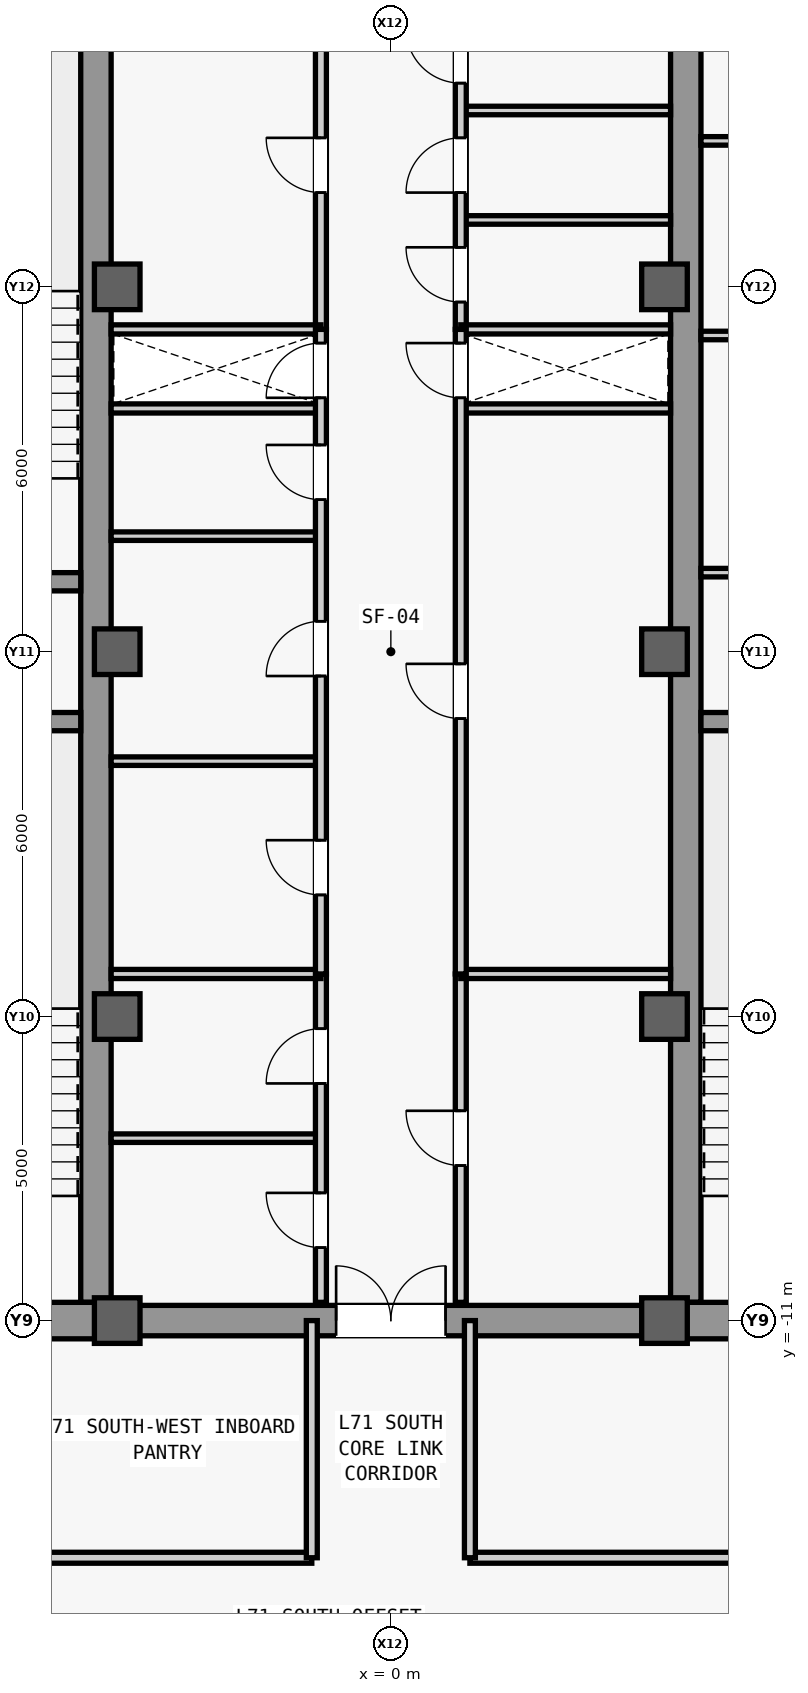
"""IFC4 building model, lengths in metres.
Left out: names, types, materials, properties, quantities, classifications, styles, units other than length and angle.
Written with IfcOpenShell. Run it as: python <this file> out.ifc"""

import sys

from ifc_helpers import new_model, si_unit, direction, frame, frame_2d, origin, origin_2d, place, context, subcontext, project, spatial, rectangle, extrude, source, transform, mapped, element, fill, save


model = new_model("IFC4")
c1 = context("Model", 3, precision=1e-05, world=origin(), true_north=direction((0.0, 1.0)))
c2 = subcontext(c1, "Body", "Model", "MODEL_VIEW")
j1 = project(units=[si_unit("LENGTHUNIT", "METRE"), si_unit("PLANEANGLEUNIT", "RADIAN")], contexts=[c1])
p1 = place(None, origin())
s1 = spatial("IfcSite", under=j1, at=p1, CompositionType="ELEMENT")
p2 = place(p1, origin())
s2 = spatial("IfcBuilding", under=s1, at=p2, CompositionType="ELEMENT")
p3 = place(p2, frame((0.0, 0.0, 301.5)))
s3 = spatial("IfcBuildingStorey", under=s2, at=p3, CompositionType="ELEMENT", Elevation=301.5)
m1 = source(origin(), c2, "Body", "SweptSolid", [
    extrude(rectangle(XDim=21.4, YDim=0.5, at=frame_2d((10.7, 0.0))), origin(), (0.0, 0.0, 1.0), 3.78),
])
for number, where, z_axis, x_axis in (
    (1, (-4.85, -10.7, 0.0), (0.0, 0.0, 1.0), (0.0, 1.0, 0.0)),
    (2, (4.85, -10.7, 0.0), (0.0, 0.0, 1.0), (0.0, 1.0, 0.0)),
):
    element("IfcWall", number, at=place(p3, frame(where, z_axis=z_axis, x_axis=x_axis)), inside=s3, PredefinedType="SHEAR", context=c2, shape_type="MappedRepresentation", body=[
        mapped(m1, transform((0.0, 0.0, 0.0), scale=1.0)),
    ])
m2 = source(origin(), c2, "Body", "SweptSolid", [
    extrude(rectangle(XDim=5.9, YDim=0.6, at=frame_2d((2.95, 0.0))), origin(), (0.0, 0.0, 1.0), 3.78),
])
for number, where, z_axis, x_axis in (
    (3, (-10.75, -11.0, 0.0), (0.0, 0.0, 1.0), (1.0, 0.0, 0.0)),
    (4, (4.85, -11.0, 0.0), (0.0, 0.0, 1.0), (1.0, 0.0, 0.0)),
):
    element("IfcWall", number, at=place(p3, frame(where, z_axis=z_axis, x_axis=x_axis)), inside=s3, PredefinedType="SHEAR", context=c2, shape_type="MappedRepresentation", body=[
        mapped(m2, transform((0.0, 0.0, 0.0), scale=1.0)),
    ])
m3 = source(origin(), c2, "Body", "SweptSolid", [
    extrude(rectangle(XDim=5.65, YDim=0.3, at=frame_2d((2.825, 0.0))), origin(), (0.0, 0.0, 1.0), 3.78),
])
for number, where, z_axis, x_axis in (
    (5, (-10.75, -1.15, 0.0), (0.0, 0.0, 1.0), (1.0, 0.0, 0.0)),
    (6, (-10.75, 1.15, 0.0), (0.0, 0.0, 1.0), (1.0, 0.0, 0.0)),
    (7, (5.1, -1.15, 0.0), (0.0, 0.0, 1.0), (1.0, 0.0, 0.0)),
):
    element("IfcWall", number, at=place(p3, frame(where, z_axis=z_axis, x_axis=x_axis)), inside=s3, PredefinedType="SHEAR", context=c2, shape_type="MappedRepresentation", body=[
        mapped(m3, transform((0.0, 0.0, 0.0), scale=1.0)),
    ])
m4 = source(origin(), c2, "Body", "SweptSolid", [
    extrude(rectangle(XDim=9.2, YDim=0.5, at=frame_2d((4.6, 0.0))), origin(), (0.0, 0.0, 1.0), 3.78),
])
p4 = place(p3, frame((-4.6, -11.0, 0.0), z_axis=(0.0, 0.0, 1.0), x_axis=(1.0, 0.0, 0.0)))
e8 = element("IfcWall", 8, at=p4, inside=s3, PredefinedType="SHEAR", context=c2, shape_type="MappedRepresentation", body=[
    mapped(m4, transform((0.0, 0.0, 0.0), scale=1.0)),
])
m5 = source(origin(), c2, "Body", "SweptSolid", [
    extrude(rectangle(XDim=1.8, YDim=2.25, at=frame_2d((0.9, 1.125))), frame((0.0, 0.26, 0.0), z_axis=(0.0, -1.0, 0.0), x_axis=(1.0, 0.0, 0.0)), (0.0, 0.0, 1.0), 0.52),
])
p5 = place(p4, frame((3.7, 0.0, 0.0)))
e9 = element("IfcOpeningElement", 9, at=p5, cuts=e8, PredefinedType="OPENING", context=c2, shape_type="MappedRepresentation", body=[
    mapped(m5, transform((0.0, 0.0, 0.0), scale=1.0)),
])
m6 = source(origin(), c2, "Body", "SweptSolid", [
    extrude(rectangle(XDim=0.75, YDim=0.75, at=origin_2d()), origin(), (0.0, 0.0, 1.0), 4.0),
])
for number, where, z_axis, x_axis in (
    (10, (-4.5, -11.0, 0.0), (0.0, 0.0, 1.0), (1.0, 0.0, 0.0)),
    (11, (-4.5, -6.0, 0.0), (0.0, 0.0, 1.0), (1.0, 0.0, 0.0)),
    (12, (-4.5, 0.0, 0.0), (0.0, 0.0, 1.0), (1.0, 0.0, 0.0)),
    (13, (-4.5, 6.0, 0.0), (0.0, 0.0, 1.0), (1.0, 0.0, 0.0)),
    (14, (4.5, -11.0, 0.0), (0.0, 0.0, 1.0), (1.0, 0.0, 0.0)),
    (15, (4.5, -6.0, 0.0), (0.0, 0.0, 1.0), (1.0, 0.0, 0.0)),
    (16, (4.5, 0.0, 0.0), (0.0, 0.0, 1.0), (1.0, 0.0, 0.0)),
    (17, (4.5, 6.0, 0.0), (0.0, 0.0, 1.0), (1.0, 0.0, 0.0)),
):
    element("IfcColumn", number, at=place(p3, frame(where, z_axis=z_axis, x_axis=x_axis)), inside=s3, PredefinedType="COLUMN", context=c2, shape_type="MappedRepresentation", body=[
        mapped(m6, transform((0.0, 0.0, 0.0), scale=1.0)),
    ])
m7 = source(origin(), c2, "Body", "SweptSolid", [
    extrude(rectangle(XDim=3.15, YDim=0.14, at=frame_2d((1.575, 0.0))), origin(), (0.0, 0.0, 1.0), 3.78),
])
p6 = place(p3, frame((5.1, 1.3, 0.0), z_axis=(0.0, 0.0, 1.0), x_axis=(1.0, 0.0, 0.0)))
e18 = element("IfcWall", 18, at=p6, inside=s3, PredefinedType="PARTITIONING", context=c2, shape_type="MappedRepresentation", body=[
    mapped(m7, transform((0.0, 0.0, 0.0), scale=1.0)),
])
p7 = place(p3, frame((5.1, 8.4, 0.0), z_axis=(0.0, 0.0, 1.0), x_axis=(1.0, 0.0, 0.0)))
e19 = element("IfcWall", 19, at=p7, inside=s3, PredefinedType="PARTITIONING", context=c2, shape_type="MappedRepresentation", body=[
    mapped(m7, transform((0.0, 0.0, 0.0), scale=1.0)),
])
m8 = source(origin(), c2, "Body", "SweptSolid", [
    extrude(rectangle(XDim=0.9, YDim=2.15, at=frame_2d((0.45, 1.075))), frame((0.0, 0.08, 0.0), z_axis=(0.0, -1.0, 0.0), x_axis=(1.0, 0.0, 0.0)), (0.0, 0.0, 1.0), 0.16),
])
p8 = place(p7, frame((1.13, 0.0, 0.0)))
e20 = element("IfcOpeningElement", 20, at=p8, cuts=e19, PredefinedType="OPENING", context=c2, shape_type="MappedRepresentation", body=[
    mapped(m8, transform((0.0, 0.0, 0.0), scale=1.0)),
])
p9 = place(p3, frame((5.1, 5.2, 0.0), z_axis=(0.0, 0.0, 1.0), x_axis=(1.0, 0.0, 0.0)))
e21 = element("IfcWall", 21, at=p9, inside=s3, PredefinedType="PARTITIONING", context=c2, shape_type="MappedRepresentation", body=[
    mapped(m7, transform((0.0, 0.0, 0.0), scale=1.0)),
])
p10 = place(p9, frame((1.13, 0.0, 0.0)))
e22 = element("IfcOpeningElement", 22, at=p10, cuts=e21, PredefinedType="OPENING", context=c2, shape_type="MappedRepresentation", body=[
    mapped(m8, transform((0.0, 0.0, 0.0), scale=1.0)),
])
m9 = source(origin(), c2, "Body", "SweptSolid", [
    extrude(rectangle(XDim=3.45, YDim=0.15, at=frame_2d((1.725, 0.0))), origin(), (0.0, 0.0, 1.0), 3.78),
])
for number, where, z_axis, x_axis in (
    (23, (-4.6, 4.0, 0.0), (0.0, 0.0, 1.0), (1.0, 0.0, 0.0)),
    (24, (1.15, 4.0, 0.0), (0.0, 0.0, 1.0), (1.0, 0.0, 0.0)),
):
    element("IfcWall", number, at=place(p3, frame(where, z_axis=z_axis, x_axis=x_axis)), inside=s3, PredefinedType="PARTITIONING", context=c2, shape_type="MappedRepresentation", body=[
        mapped(m9, transform((0.0, 0.0, 0.0), scale=1.0)),
    ])
m10 = source(origin(), c2, "Body", "SweptSolid", [
    extrude(rectangle(XDim=3.45, YDim=0.14, at=frame_2d((1.725, 0.0))), origin(), (0.0, 0.0, 1.0), 3.78),
])
p11 = place(p3, frame((-4.6, -8.0, 0.0), z_axis=(0.0, 0.0, 1.0), x_axis=(1.0, 0.0, 0.0)))
e25 = element("IfcWall", 25, at=p11, inside=s3, PredefinedType="PARTITIONING", context=c2, shape_type="MappedRepresentation", body=[
    mapped(m10, transform((0.0, 0.0, 0.0), scale=1.0)),
])
m11 = source(origin(), c2, "Body", "SweptSolid", [
    extrude(rectangle(XDim=5.4, YDim=0.18, at=frame_2d((2.7, 0.0))), origin(), (0.0, 0.0, 1.0), 3.78),
])
p12 = place(p3, frame((-1.15, -10.7, 0.0), z_axis=(0.0, 0.0, 1.0), x_axis=(0.0, 1.0, 0.0)))
e26 = element("IfcWall", 26, at=p12, inside=s3, PredefinedType="PARTITIONING", context=c2, shape_type="MappedRepresentation", body=[
    mapped(m11, transform((0.0, 0.0, 0.0), scale=1.0)),
])
m12 = source(origin(), c2, "Body", "SweptSolid", [
    extrude(rectangle(XDim=0.9, YDim=2.15, at=frame_2d((0.45, 1.075))), frame((0.0, 0.1, 0.0), z_axis=(0.0, -1.0, 0.0), x_axis=(1.0, 0.0, 0.0)), (0.0, 0.0, 1.0), 0.2),
])
p13 = place(p12, frame((0.9, 0.0, 0.0)))
e27 = element("IfcOpeningElement", 27, at=p13, cuts=e26, PredefinedType="OPENING", context=c2, shape_type="MappedRepresentation", body=[
    mapped(m12, transform((0.0, 0.0, 0.0), scale=1.0)),
])
p14 = place(p12, frame((3.6, 0.0, 0.0)))
e28 = element("IfcOpeningElement", 28, at=p14, cuts=e26, PredefinedType="OPENING", context=c2, shape_type="MappedRepresentation", body=[
    mapped(m12, transform((0.0, 0.0, 0.0), scale=1.0)),
])
p15 = place(p3, frame((1.15, -10.7, 0.0), z_axis=(0.0, 0.0, 1.0), x_axis=(0.0, 1.0, 0.0)))
e29 = element("IfcWall", 29, at=p15, inside=s3, PredefinedType="PARTITIONING", context=c2, shape_type="MappedRepresentation", body=[
    mapped(m11, transform((0.0, 0.0, 0.0), scale=1.0)),
])
p16 = place(p15, frame((2.25, 0.0, 0.0)))
e30 = element("IfcOpeningElement", 30, at=p16, cuts=e29, PredefinedType="OPENING", context=c2, shape_type="MappedRepresentation", body=[
    mapped(m12, transform((0.0, 0.0, 0.0), scale=1.0)),
])
for number, where, z_axis, x_axis in (
    (31, (-4.6, -5.3, 0.0), (0.0, 0.0, 1.0), (1.0, 0.0, 0.0)),
    (32, (1.15, -5.3, 0.0), (0.0, 0.0, 1.0), (1.0, 0.0, 0.0)),
):
    element("IfcWall", number, at=place(p3, frame(where, z_axis=z_axis, x_axis=x_axis)), inside=s3, PredefinedType="PARTITIONING", context=c2, shape_type="MappedRepresentation", body=[
        mapped(m9, transform((0.0, 0.0, 0.0), scale=1.0)),
    ])
p17 = place(p3, frame((-1.15, 5.3, 0.0), z_axis=(0.0, 0.0, 1.0), x_axis=(0.0, 1.0, 0.0)))
e33 = element("IfcWall", 33, at=p17, inside=s3, PredefinedType="PARTITIONING", context=c2, shape_type="MappedRepresentation", body=[
    mapped(m11, transform((0.0, 0.0, 0.0), scale=1.0)),
])
p18 = place(p17, frame((2.25, 0.0, 0.0)))
e34 = element("IfcOpeningElement", 34, at=p18, cuts=e33, PredefinedType="OPENING", context=c2, shape_type="MappedRepresentation", body=[
    mapped(m12, transform((0.0, 0.0, 0.0), scale=1.0)),
])
for number, where, z_axis, x_axis in (
    (35, (1.15, 7.1, 0.0), (0.0, 0.0, 1.0), (1.0, 0.0, 0.0)),
    (36, (1.15, 8.9, 0.0), (0.0, 0.0, 1.0), (1.0, 0.0, 0.0)),
):
    element("IfcWall", number, at=place(p3, frame(where, z_axis=z_axis, x_axis=x_axis)), inside=s3, PredefinedType="PARTITIONING", context=c2, shape_type="MappedRepresentation", body=[
        mapped(m10, transform((0.0, 0.0, 0.0), scale=1.0)),
    ])
p19 = place(p3, frame((1.15, 5.3, 0.0), z_axis=(0.0, 0.0, 1.0), x_axis=(0.0, 1.0, 0.0)))
e37 = element("IfcWall", 37, at=p19, inside=s3, PredefinedType="PARTITIONING", context=c2, shape_type="MappedRepresentation", body=[
    mapped(m11, transform((0.0, 0.0, 0.0), scale=1.0)),
])
p20 = place(p19, frame((0.45, 0.0, 0.0)))
e38 = element("IfcOpeningElement", 38, at=p20, cuts=e37, PredefinedType="OPENING", context=c2, shape_type="MappedRepresentation", body=[
    mapped(m12, transform((0.0, 0.0, 0.0), scale=1.0)),
])
p21 = place(p19, frame((2.25, 0.0, 0.0)))
e39 = element("IfcOpeningElement", 39, at=p21, cuts=e37, PredefinedType="OPENING", context=c2, shape_type="MappedRepresentation", body=[
    mapped(m12, transform((0.0, 0.0, 0.0), scale=1.0)),
])
p22 = place(p19, frame((4.05, 0.0, 0.0)))
e40 = element("IfcOpeningElement", 40, at=p22, cuts=e37, PredefinedType="OPENING", context=c2, shape_type="MappedRepresentation", body=[
    mapped(m12, transform((0.0, 0.0, 0.0), scale=1.0)),
])
for number, where, z_axis, x_axis in (
    (41, (-4.6, 5.3, 0.0), (0.0, 0.0, 1.0), (1.0, 0.0, 0.0)),
    (42, (1.15, 5.3, 0.0), (0.0, 0.0, 1.0), (1.0, 0.0, 0.0)),
):
    element("IfcWall", number, at=place(p3, frame(where, z_axis=z_axis, x_axis=x_axis)), inside=s3, PredefinedType="PARTITIONING", context=c2, shape_type="MappedRepresentation", body=[
        mapped(m9, transform((0.0, 0.0, 0.0), scale=1.0)),
    ])
for number, where, z_axis, x_axis in (
    (43, (-4.6, -1.8, 0.0), (0.0, 0.0, 1.0), (1.0, 0.0, 0.0)),
    (44, (-4.6, 1.9, 0.0), (0.0, 0.0, 1.0), (1.0, 0.0, 0.0)),
):
    element("IfcWall", number, at=place(p3, frame(where, z_axis=z_axis, x_axis=x_axis)), inside=s3, PredefinedType="PARTITIONING", context=c2, shape_type="MappedRepresentation", body=[
        mapped(m10, transform((0.0, 0.0, 0.0), scale=1.0)),
    ])
m13 = source(origin(), c2, "Body", "SweptSolid", [
    extrude(rectangle(XDim=10.6, YDim=0.18, at=frame_2d((5.3, 0.0))), origin(), (0.0, 0.0, 1.0), 3.78),
])
p23 = place(p3, frame((-1.15, -5.3, 0.0), z_axis=(0.0, 0.0, 1.0), x_axis=(0.0, 1.0, 0.0)))
e45 = element("IfcWall", 45, at=p23, inside=s3, PredefinedType="PARTITIONING", context=c2, shape_type="MappedRepresentation", body=[
    mapped(m13, transform((0.0, 0.0, 0.0), scale=1.0)),
])
p24 = place(p23, frame((1.3, 0.0, 0.0)))
e46 = element("IfcOpeningElement", 46, at=p24, cuts=e45, PredefinedType="OPENING", context=c2, shape_type="MappedRepresentation", body=[
    mapped(m12, transform((0.0, 0.0, 0.0), scale=1.0)),
])
p25 = place(p23, frame((4.9, 0.0, 0.0)))
e47 = element("IfcOpeningElement", 47, at=p25, cuts=e45, PredefinedType="OPENING", context=c2, shape_type="MappedRepresentation", body=[
    mapped(m12, transform((0.0, 0.0, 0.0), scale=1.0)),
])
p26 = place(p23, frame((7.8, 0.0, 0.0)))
e48 = element("IfcOpeningElement", 48, at=p26, cuts=e45, PredefinedType="OPENING", context=c2, shape_type="MappedRepresentation", body=[
    mapped(m12, transform((0.0, 0.0, 0.0), scale=1.0)),
])
p27 = place(p23, frame((9.475, 0.0, 0.0)))
e49 = element("IfcOpeningElement", 49, at=p27, cuts=e45, PredefinedType="OPENING", context=c2, shape_type="MappedRepresentation", body=[
    mapped(m12, transform((0.0, 0.0, 0.0), scale=1.0)),
])
p28 = place(p3, frame((1.15, -5.3, 0.0), z_axis=(0.0, 0.0, 1.0), x_axis=(0.0, 1.0, 0.0)))
e50 = element("IfcWall", 50, at=p28, inside=s3, PredefinedType="PARTITIONING", context=c2, shape_type="MappedRepresentation", body=[
    mapped(m13, transform((0.0, 0.0, 0.0), scale=1.0)),
])
p29 = place(p28, frame((4.2, 0.0, 0.0)))
e51 = element("IfcOpeningElement", 51, at=p29, cuts=e50, PredefinedType="OPENING", context=c2, shape_type="MappedRepresentation", body=[
    mapped(m12, transform((0.0, 0.0, 0.0), scale=1.0)),
])
p30 = place(p28, frame((9.475, 0.0, 0.0)))
e52 = element("IfcOpeningElement", 52, at=p30, cuts=e50, PredefinedType="OPENING", context=c2, shape_type="MappedRepresentation", body=[
    mapped(m12, transform((0.0, 0.0, 0.0), scale=1.0)),
])
m14 = source(origin(), c2, "Body", "SweptSolid", [
    extrude(rectangle(XDim=16.1, YDim=0.18, at=frame_2d((8.05, 0.0))), origin(), (0.0, 0.0, 1.0), 3.78),
])
p31 = place(p3, frame((-17.4, -14.9, 0.0), z_axis=(0.0, 0.0, 1.0), x_axis=(1.0, 0.0, 0.0)))
e53 = element("IfcWall", 53, at=p31, inside=s3, PredefinedType="PARTITIONING", context=c2, shape_type="MappedRepresentation", body=[
    mapped(m14, transform((0.0, 0.0, 0.0), scale=1.0)),
])
p32 = place(p31, frame((8.95, 0.0, 0.0)))
e54 = element("IfcOpeningElement", 54, at=p32, cuts=e53, PredefinedType="OPENING", context=c2, shape_type="MappedRepresentation", body=[
    mapped(m12, transform((0.0, 0.0, 0.0), scale=1.0)),
])
m15 = source(origin(), c2, "Body", "SweptSolid", [
    extrude(rectangle(XDim=3.9, YDim=0.18, at=frame_2d((1.95, 0.0))), origin(), (0.0, 0.0, 1.0), 3.78),
])
p33 = place(p3, frame((-1.3, -14.9, 0.0), z_axis=(0.0, 0.0, 1.0), x_axis=(0.0, 1.0, 0.0)))
e55 = element("IfcWall", 55, at=p33, inside=s3, PredefinedType="PARTITIONING", context=c2, shape_type="MappedRepresentation", body=[
    mapped(m15, transform((0.0, 0.0, 0.0), scale=1.0)),
])
m16 = source(origin(), c2, "Body", "SweptSolid", [
    extrude(rectangle(XDim=14.05, YDim=0.18, at=frame_2d((7.025, 0.0))), origin(), (0.0, 0.0, 1.0), 3.78),
])
p34 = place(p3, frame((1.3, -14.9, 0.0), z_axis=(0.0, 0.0, 1.0), x_axis=(1.0, 0.0, 0.0)))
e56 = element("IfcWall", 56, at=p34, inside=s3, PredefinedType="PARTITIONING", context=c2, shape_type="MappedRepresentation", body=[
    mapped(m16, transform((0.0, 0.0, 0.0), scale=1.0)),
])
p35 = place(p34, frame((6.25, 0.0, 0.0)))
e57 = element("IfcOpeningElement", 57, at=p35, cuts=e56, PredefinedType="OPENING", context=c2, shape_type="MappedRepresentation", body=[
    mapped(m12, transform((0.0, 0.0, 0.0), scale=1.0)),
])
p36 = place(p3, frame((1.3, -14.9, 0.0), z_axis=(0.0, 0.0, 1.0), x_axis=(0.0, 1.0, 0.0)))
e58 = element("IfcWall", 58, at=p36, inside=s3, PredefinedType="PARTITIONING", context=c2, shape_type="MappedRepresentation", body=[
    mapped(m15, transform((0.0, 0.0, 0.0), scale=1.0)),
])
m17 = source(origin(), c2, "Body", "SweptSolid", [
    extrude(rectangle(XDim=0.9, YDim=2.15, at=frame_2d((0.45, 1.075))), frame((0.0, 0.025, 0.0), z_axis=(0.0, -1.0, 0.0), x_axis=(1.0, 0.0, 0.0)), (0.0, 0.0, 1.0), 0.05),
])
p37 = place(p13, origin())
e59 = element("IfcDoor", 59, at=p37, inside=s3, OperationType="SINGLE_SWING_RIGHT", PredefinedType="DOOR", context=c2, shape_type="MappedRepresentation", body=[
    mapped(m17, transform((0.0, 0.0, 0.0), scale=1.0)),
])
fill(e27, e59)
p38 = place(p14, origin())
e60 = element("IfcDoor", 60, at=p38, inside=s3, OperationType="SINGLE_SWING_LEFT", PredefinedType="DOOR", context=c2, shape_type="MappedRepresentation", body=[
    mapped(m17, transform((0.0, 0.0, 0.0), scale=1.0)),
])
fill(e28, e60)
p39 = place(p16, origin())
e61 = element("IfcDoor", 61, at=p39, inside=s3, OperationType="SINGLE_SWING_RIGHT", PredefinedType="DOOR", context=c2, shape_type="MappedRepresentation", body=[
    mapped(m17, transform((0.0, 0.0, 0.0), scale=1.0)),
])
fill(e30, e61)
m18 = source(origin(), c2, "Body", "SweptSolid", [
    extrude(rectangle(XDim=1.8, YDim=2.25, at=frame_2d((0.9, 1.125))), frame((0.0, 0.025, 0.0), z_axis=(0.0, -1.0, 0.0), x_axis=(1.0, 0.0, 0.0)), (0.0, 0.0, 1.0), 0.05),
])
p40 = place(p5, origin())
e62 = element("IfcDoor", 62, at=p40, inside=s3, OperationType="SINGLE_SWING_LEFT", PredefinedType="DOOR", context=c2, shape_type="MappedRepresentation", body=[
    mapped(m18, transform((0.0, 0.0, 0.0), scale=1.0)),
])
fill(e9, e62)
p41 = place(p18, origin())
e63 = element("IfcDoor", 63, at=p41, inside=s3, OperationType="SINGLE_SWING_RIGHT", PredefinedType="DOOR", context=c2, shape_type="MappedRepresentation", body=[
    mapped(m17, transform((0.0, 0.0, 0.0), scale=1.0)),
])
fill(e34, e63)
p42 = place(p20, origin())
e64 = element("IfcDoor", 64, at=p42, inside=s3, OperationType="SINGLE_SWING_RIGHT", PredefinedType="DOOR", context=c2, shape_type="MappedRepresentation", body=[
    mapped(m17, transform((0.0, 0.0, 0.0), scale=1.0)),
])
fill(e38, e64)
p43 = place(p21, origin())
e65 = element("IfcDoor", 65, at=p43, inside=s3, OperationType="SINGLE_SWING_LEFT", PredefinedType="DOOR", context=c2, shape_type="MappedRepresentation", body=[
    mapped(m17, transform((0.0, 0.0, 0.0), scale=1.0)),
])
fill(e39, e65)
p44 = place(p22, origin())
e66 = element("IfcDoor", 66, at=p44, inside=s3, OperationType="SINGLE_SWING_RIGHT", PredefinedType="DOOR", context=c2, shape_type="MappedRepresentation", body=[
    mapped(m17, transform((0.0, 0.0, 0.0), scale=1.0)),
])
fill(e40, e66)
p45 = place(p24, origin())
e67 = element("IfcDoor", 67, at=p45, inside=s3, OperationType="SINGLE_SWING_RIGHT", PredefinedType="DOOR", context=c2, shape_type="MappedRepresentation", body=[
    mapped(m17, transform((0.0, 0.0, 0.0), scale=1.0)),
])
fill(e46, e67)
p46 = place(p25, origin())
e68 = element("IfcDoor", 68, at=p46, inside=s3, OperationType="SINGLE_SWING_LEFT", PredefinedType="DOOR", context=c2, shape_type="MappedRepresentation", body=[
    mapped(m17, transform((0.0, 0.0, 0.0), scale=1.0)),
])
fill(e47, e68)
p47 = place(p26, origin())
e69 = element("IfcDoor", 69, at=p47, inside=s3, OperationType="SINGLE_SWING_RIGHT", PredefinedType="DOOR", context=c2, shape_type="MappedRepresentation", body=[
    mapped(m17, transform((0.0, 0.0, 0.0), scale=1.0)),
])
fill(e48, e69)
p48 = place(p29, origin())
e70 = element("IfcDoor", 70, at=p48, inside=s3, OperationType="SINGLE_SWING_RIGHT", PredefinedType="DOOR", context=c2, shape_type="MappedRepresentation", body=[
    mapped(m17, transform((0.0, 0.0, 0.0), scale=1.0)),
])
fill(e51, e70)
p49 = place(p27, origin())
e71 = element("IfcDoor", 71, at=p49, inside=s3, OperationType="SINGLE_SWING_LEFT", PredefinedType="DOOR", context=c2, shape_type="MappedRepresentation", body=[
    mapped(m17, transform((0.0, 0.0, 0.0), scale=1.0)),
])
fill(e49, e71)
p50 = place(p30, origin())
e72 = element("IfcDoor", 72, at=p50, inside=s3, OperationType="SINGLE_SWING_RIGHT", PredefinedType="DOOR", context=c2, shape_type="MappedRepresentation", body=[
    mapped(m17, transform((0.0, 0.0, 0.0), scale=1.0)),
])
fill(e52, e72)
save(model, sys.argv[1])
